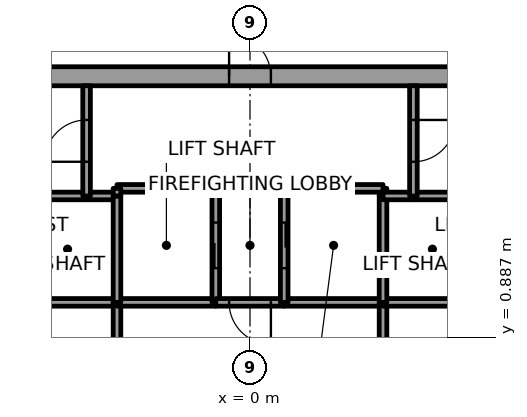
"""IFC4 building model, lengths in metres.
Left out: names, types, materials, properties, quantities, classifications, styles, units other than length and angle.
Written with IfcOpenShell. Run it as: python <this file> out.ifc"""

import sys

from ifc_helpers import new_model, si_unit, direction, frame, frame_2d, origin, place, context, subcontext, project, spatial, rectangle, extrude, element, fill, save


model = new_model("IFC4")
c1 = context("Model", 3, precision=1e-05, world=origin(), true_north=direction((0.0, 1.0)))
c2 = subcontext(c1, "Body", "Model", "MODEL_VIEW")
j1 = project(units=[si_unit("LENGTHUNIT", "METRE"), si_unit("PLANEANGLEUNIT", "RADIAN")], contexts=[c1])
p1 = place(None, origin())
s1 = spatial("IfcSite", under=j1, at=p1, CompositionType="ELEMENT")
p2 = place(p1, origin())
s2 = spatial("IfcBuilding", under=s1, at=p2, CompositionType="ELEMENT")
p3 = place(p2, frame((0.0, 0.0, 107.2)))
s3 = spatial("IfcBuildingStorey", under=s2, at=p3, CompositionType="ELEMENT", Elevation=107.2)
p4 = place(p3, frame((-11.0, 7.75, 0.0), z_axis=(0.0, 0.0, 1.0), x_axis=(1.0, 0.0, 0.0)))
e1 = element("IfcWall", 1, at=p4, inside=s3, PredefinedType="SHEAR", context=c2, shape_type="SweptSolid", body=[
    extrude(rectangle(XDim=22.0, YDim=0.5, at=frame_2d((11.0, 0.0))), origin(), (0.0, 0.0, 1.0), 5.4),
])
p5 = place(p4, frame((10.45, 0.0, 0.0)))
e2 = element("IfcOpeningElement", 2, at=p5, cuts=e1, PredefinedType="OPENING", context=c2, shape_type="SweptSolid", body=[
    extrude(rectangle(XDim=1.1, YDim=2.1, at=frame_2d((0.55, 1.05))), frame((0.0, 0.25, 0.0), z_axis=(0.0, -1.0, 0.0), x_axis=(1.0, 0.0, 0.0)), (0.0, 0.0, 1.0), 0.5),
])
p6 = place(p3, frame((-3.5, 1.8, 0.0), z_axis=(0.0, 0.0, 1.0), x_axis=(-1.0, 0.0, 0.0)))
e3 = element("IfcWall", 3, at=p6, inside=s3, PredefinedType="SOLIDWALL", context=c2, shape_type="SweptSolid", body=[
    extrude(rectangle(XDim=2.6, YDim=0.2, at=frame_2d((1.3, 0.0))), origin(), (0.0, 0.0, 1.0), 5.25),
])
p7 = place(p3, frame((-4.3, 4.6, 0.0), z_axis=(0.0, 0.0, 1.0), x_axis=(-1.0, 0.0, 0.0)))
e4 = element("IfcWall", 4, at=p7, inside=s3, PredefinedType="SOLIDWALL", context=c2, shape_type="SweptSolid", body=[
    extrude(rectangle(XDim=1.8, YDim=0.2, at=frame_2d((0.9, 0.0))), origin(), (0.0, 0.0, 1.0), 5.25),
])
p8 = place(p3, frame((-3.5, 4.6, 0.0), z_axis=(0.0, 0.0, 1.0), x_axis=(-1.0, 0.0, 0.0)))
e5 = element("IfcWall", 5, at=p8, inside=s3, PredefinedType="SOLIDWALL", context=c2, shape_type="SweptSolid", body=[
    extrude(rectangle(XDim=0.8, YDim=0.2, at=frame_2d((0.4, 0.0))), origin(), (0.0, 0.0, 1.0), 5.25),
])
p9 = place(p3, frame((-4.3, 4.6, 0.0), z_axis=(0.0, 0.0, 1.0), x_axis=(0.0, 1.0, 0.0)))
e6 = element("IfcWall", 6, at=p9, inside=s3, PredefinedType="SOLIDWALL", context=c2, shape_type="SweptSolid", body=[
    extrude(rectangle(XDim=2.9, YDim=0.2, at=frame_2d((1.45, 0.0))), origin(), (0.0, 0.0, 1.0), 5.25),
])
p10 = place(p9, frame((0.9, 0.0, 0.0)))
e7 = element("IfcOpeningElement", 7, at=p10, cuts=e6, PredefinedType="OPENING", context=c2, shape_type="SweptSolid", body=[
    extrude(rectangle(XDim=1.1, YDim=2.1, at=frame_2d((0.55, 1.05))), frame((0.0, 0.1, 0.0), z_axis=(0.0, -1.0, 0.0), x_axis=(1.0, 0.0, 0.0)), (0.0, 0.0, 1.0), 0.2),
])
p11 = place(p3, frame((-3.5, 1.8, 0.0), z_axis=(0.0, 0.0, 1.0), x_axis=(0.0, -1.0, 0.0)))
e8 = element("IfcWall", 8, at=p11, inside=s3, PredefinedType="SOLIDWALL", context=c2, shape_type="SweptSolid", body=[
    extrude(rectangle(XDim=3.6, YDim=0.2, at=frame_2d((1.8, 0.0))), origin(), (0.0, 0.0, 1.0), 5.25),
])
p12 = place(p11, frame((1.05, 0.0, 0.0)))
e9 = element("IfcOpeningElement", 9, at=p12, cuts=e8, PredefinedType="OPENING", context=c2, shape_type="SweptSolid", body=[
    extrude(rectangle(XDim=1.5, YDim=2.1, at=frame_2d((0.75, 1.05))), frame((0.0, 0.1, 0.0), z_axis=(0.0, -1.0, 0.0), x_axis=(1.0, 0.0, 0.0)), (0.0, 0.0, 1.0), 0.2),
])
p13 = place(p3, frame((-0.9, 1.8, 0.0), z_axis=(0.0, 0.0, 1.0), x_axis=(-1.0, 0.0, 0.0)))
e10 = element("IfcWall", 10, at=p13, inside=s3, PredefinedType="SOLIDWALL", context=c2, shape_type="SweptSolid", body=[
    extrude(rectangle(XDim=2.6, YDim=0.2, at=frame_2d((1.3, 0.0))), origin(), (0.0, 0.0, 1.0), 5.25),
])
p14 = place(p3, frame((-3.5, 4.6, 0.0), z_axis=(0.0, 0.0, 1.0), x_axis=(0.0, -1.0, 0.0)))
e11 = element("IfcWall", 11, at=p14, inside=s3, PredefinedType="SOLIDWALL", context=c2, shape_type="SweptSolid", body=[
    extrude(rectangle(XDim=2.8, YDim=0.2, at=frame_2d((1.4, 0.0))), origin(), (0.0, 0.0, 1.0), 5.25),
])
p15 = place(p3, frame((-0.9, 1.8, 0.0), z_axis=(0.0, 0.0, 1.0), x_axis=(0.0, 1.0, 0.0)))
e12 = element("IfcWall", 12, at=p15, inside=s3, PredefinedType="SOLIDWALL", context=c2, shape_type="SweptSolid", body=[
    extrude(rectangle(XDim=3.0, YDim=0.2, at=frame_2d((1.5, 0.0))), origin(), (0.0, 0.0, 1.0), 5.25),
])
p16 = place(p15, frame((0.9, 0.0, 0.0)))
e13 = element("IfcOpeningElement", 13, at=p16, cuts=e12, PredefinedType="OPENING", context=c2, shape_type="SweptSolid", body=[
    extrude(rectangle(XDim=1.2, YDim=2.1, at=frame_2d((0.6, 1.05))), frame((0.0, 0.1, 0.0), z_axis=(0.0, -1.0, 0.0), x_axis=(1.0, 0.0, 0.0)), (0.0, 0.0, 1.0), 0.2),
])
p17 = place(p3, frame((-0.9, 4.8, 0.0), z_axis=(0.0, 0.0, 1.0), x_axis=(-1.0, 0.0, 0.0)))
e14 = element("IfcWall", 14, at=p17, inside=s3, PredefinedType="SOLIDWALL", context=c2, shape_type="SweptSolid", body=[
    extrude(rectangle(XDim=2.6, YDim=0.2, at=frame_2d((1.3, 0.0))), origin(), (0.0, 0.0, 1.0), 5.25),
])
p18 = place(p3, frame((-3.5, 4.8, 0.0), z_axis=(0.0, 0.0, 1.0), x_axis=(0.0, -1.0, 0.0)))
e15 = element("IfcWall", 15, at=p18, inside=s3, PredefinedType="SOLIDWALL", context=c2, shape_type="SweptSolid", body=[
    extrude(rectangle(XDim=0.2, YDim=0.2, at=frame_2d((0.1, 0.0))), origin(), (0.0, 0.0, 1.0), 5.25),
])
p19 = place(p3, frame((0.9, 1.8, 0.0), z_axis=(0.0, 0.0, 1.0), x_axis=(-1.0, 0.0, 0.0)))
e16 = element("IfcWall", 16, at=p19, inside=s3, PredefinedType="SOLIDWALL", context=c2, shape_type="SweptSolid", body=[
    extrude(rectangle(XDim=1.8, YDim=0.2, at=frame_2d((0.9, 0.0))), origin(), (0.0, 0.0, 1.0), 5.25),
])
p20 = place(p19, frame((0.35, 0.0, 0.0)))
e17 = element("IfcOpeningElement", 17, at=p20, cuts=e16, PredefinedType="OPENING", context=c2, shape_type="SweptSolid", body=[
    extrude(rectangle(XDim=1.1, YDim=2.1, at=frame_2d((0.55, 1.05))), frame((0.0, 0.1, 0.0), z_axis=(0.0, -1.0, 0.0), x_axis=(1.0, 0.0, 0.0)), (0.0, 0.0, 1.0), 0.2),
])
p21 = place(p3, frame((3.5, 1.8, 0.0), z_axis=(0.0, 0.0, 1.0), x_axis=(-1.0, 0.0, 0.0)))
e18 = element("IfcWall", 18, at=p21, inside=s3, PredefinedType="SOLIDWALL", context=c2, shape_type="SweptSolid", body=[
    extrude(rectangle(XDim=2.6, YDim=0.2, at=frame_2d((1.3, 0.0))), origin(), (0.0, 0.0, 1.0), 5.25),
])
p22 = place(p3, frame((3.5, 4.6, 0.0), z_axis=(0.0, 0.0, 1.0), x_axis=(0.0, 1.0, 0.0)))
e19 = element("IfcWall", 19, at=p22, inside=s3, PredefinedType="SOLIDWALL", context=c2, shape_type="SweptSolid", body=[
    extrude(rectangle(XDim=0.2, YDim=0.2, at=frame_2d((0.1, 0.0))), origin(), (0.0, 0.0, 1.0), 5.25),
])
p23 = place(p3, frame((3.5, 4.8, 0.0), z_axis=(0.0, 0.0, 1.0), x_axis=(-1.0, 0.0, 0.0)))
e20 = element("IfcWall", 20, at=p23, inside=s3, PredefinedType="SOLIDWALL", context=c2, shape_type="SweptSolid", body=[
    extrude(rectangle(XDim=2.6, YDim=0.2, at=frame_2d((1.3, 0.0))), origin(), (0.0, 0.0, 1.0), 5.25),
])
p24 = place(p3, frame((0.9, 4.8, 0.0), z_axis=(0.0, 0.0, 1.0), x_axis=(0.0, -1.0, 0.0)))
e21 = element("IfcWall", 21, at=p24, inside=s3, PredefinedType="SOLIDWALL", context=c2, shape_type="SweptSolid", body=[
    extrude(rectangle(XDim=3.0, YDim=0.2, at=frame_2d((1.5, 0.0))), origin(), (0.0, 0.0, 1.0), 5.25),
])
p25 = place(p24, frame((0.9, 0.0, 0.0)))
e22 = element("IfcOpeningElement", 22, at=p25, cuts=e21, PredefinedType="OPENING", context=c2, shape_type="SweptSolid", body=[
    extrude(rectangle(XDim=1.2, YDim=2.1, at=frame_2d((0.6, 1.05))), frame((0.0, 0.1, 0.0), z_axis=(0.0, -1.0, 0.0), x_axis=(1.0, 0.0, 0.0)), (0.0, 0.0, 1.0), 0.2),
])
p26 = place(p3, frame((3.5, -1.8, 0.0), z_axis=(0.0, 0.0, 1.0), x_axis=(0.0, 1.0, 0.0)))
e23 = element("IfcWall", 23, at=p26, inside=s3, PredefinedType="SOLIDWALL", context=c2, shape_type="SweptSolid", body=[
    extrude(rectangle(XDim=3.6, YDim=0.2, at=frame_2d((1.8, 0.0))), origin(), (0.0, 0.0, 1.0), 5.25),
])
p27 = place(p26, frame((1.05, 0.0, 0.0)))
e24 = element("IfcOpeningElement", 24, at=p27, cuts=e23, PredefinedType="OPENING", context=c2, shape_type="SweptSolid", body=[
    extrude(rectangle(XDim=1.5, YDim=2.1, at=frame_2d((0.75, 1.05))), frame((0.0, 0.1, 0.0), z_axis=(0.0, -1.0, 0.0), x_axis=(1.0, 0.0, 0.0)), (0.0, 0.0, 1.0), 0.2),
])
p28 = place(p3, frame((6.1, 1.8, 0.0), z_axis=(0.0, 0.0, 1.0), x_axis=(-1.0, 0.0, 0.0)))
e25 = element("IfcWall", 25, at=p28, inside=s3, PredefinedType="SOLIDWALL", context=c2, shape_type="SweptSolid", body=[
    extrude(rectangle(XDim=2.6, YDim=0.2, at=frame_2d((1.3, 0.0))), origin(), (0.0, 0.0, 1.0), 5.25),
])
p29 = place(p3, frame((3.5, 1.8, 0.0), z_axis=(0.0, 0.0, 1.0), x_axis=(0.0, 1.0, 0.0)))
e26 = element("IfcWall", 26, at=p29, inside=s3, PredefinedType="SOLIDWALL", context=c2, shape_type="SweptSolid", body=[
    extrude(rectangle(XDim=2.8, YDim=0.2, at=frame_2d((1.4, 0.0))), origin(), (0.0, 0.0, 1.0), 5.25),
])
p30 = place(p3, frame((4.3, 4.6, 0.0), z_axis=(0.0, 0.0, 1.0), x_axis=(-1.0, 0.0, 0.0)))
e27 = element("IfcWall", 27, at=p30, inside=s3, PredefinedType="SOLIDWALL", context=c2, shape_type="SweptSolid", body=[
    extrude(rectangle(XDim=0.8, YDim=0.2, at=frame_2d((0.4, 0.0))), origin(), (0.0, 0.0, 1.0), 5.25),
])
p31 = place(p3, frame((6.1, 4.6, 0.0), z_axis=(0.0, 0.0, 1.0), x_axis=(-1.0, 0.0, 0.0)))
e28 = element("IfcWall", 28, at=p31, inside=s3, PredefinedType="SOLIDWALL", context=c2, shape_type="SweptSolid", body=[
    extrude(rectangle(XDim=1.8, YDim=0.2, at=frame_2d((0.9, 0.0))), origin(), (0.0, 0.0, 1.0), 5.25),
])
p32 = place(p3, frame((4.3, 7.5, 0.0), z_axis=(0.0, 0.0, 1.0), x_axis=(0.0, -1.0, 0.0)))
e29 = element("IfcWall", 29, at=p32, inside=s3, PredefinedType="SOLIDWALL", context=c2, shape_type="SweptSolid", body=[
    extrude(rectangle(XDim=2.9, YDim=0.2, at=frame_2d((1.45, 0.0))), origin(), (0.0, 0.0, 1.0), 5.25),
])
p33 = place(p32, frame((0.9, 0.0, 0.0)))
e30 = element("IfcOpeningElement", 30, at=p33, cuts=e29, PredefinedType="OPENING", context=c2, shape_type="SweptSolid", body=[
    extrude(rectangle(XDim=1.1, YDim=2.1, at=frame_2d((0.55, 1.05))), frame((0.0, 0.1, 0.0), z_axis=(0.0, -1.0, 0.0), x_axis=(1.0, 0.0, 0.0)), (0.0, 0.0, 1.0), 0.2),
])
p34 = place(p16, origin())
e31 = element("IfcDoor", 31, at=p34, inside=s3, OperationType="SLIDING_TO_RIGHT", PredefinedType="DOOR", context=c2, shape_type="SweptSolid", body=[
    extrude(rectangle(XDim=1.2, YDim=2.1, at=frame_2d((0.6, 1.05))), frame((0.0, 0.025, 0.0), z_axis=(0.0, -1.0, 0.0), x_axis=(1.0, 0.0, 0.0)), (0.0, 0.0, 1.0), 0.05),
])
fill(e13, e31)
p35 = place(p25, origin())
e32 = element("IfcDoor", 32, at=p35, inside=s3, OperationType="SLIDING_TO_LEFT", PredefinedType="DOOR", context=c2, shape_type="SweptSolid", body=[
    extrude(rectangle(XDim=1.2, YDim=2.1, at=frame_2d((0.6, 1.05))), frame((0.0, 0.025, 0.0), z_axis=(0.0, -1.0, 0.0), x_axis=(1.0, 0.0, 0.0)), (0.0, 0.0, 1.0), 0.05),
])
fill(e22, e32)
p36 = place(p20, origin())
e33 = element("IfcDoor", 33, at=p36, inside=s3, OperationType="SINGLE_SWING_LEFT", PredefinedType="DOOR", context=c2, shape_type="SweptSolid", body=[
    extrude(rectangle(XDim=1.1, YDim=2.1, at=frame_2d((0.55, 1.05))), frame((0.0, 0.025, 0.0), z_axis=(0.0, -1.0, 0.0), x_axis=(1.0, 0.0, 0.0)), (0.0, 0.0, 1.0), 0.05),
])
fill(e17, e33)
p37 = place(p10, origin())
e34 = element("IfcDoor", 34, at=p37, inside=s3, OperationType="SINGLE_SWING_RIGHT", PredefinedType="DOOR", context=c2, shape_type="SweptSolid", body=[
    extrude(rectangle(XDim=1.1, YDim=2.1, at=frame_2d((0.55, 1.05))), frame((0.0, 0.025, 0.0), z_axis=(0.0, -1.0, 0.0), x_axis=(1.0, 0.0, 0.0)), (0.0, 0.0, 1.0), 0.05),
])
fill(e7, e34)
p38 = place(p33, origin())
e35 = element("IfcDoor", 35, at=p38, inside=s3, OperationType="SINGLE_SWING_LEFT", PredefinedType="DOOR", context=c2, shape_type="SweptSolid", body=[
    extrude(rectangle(XDim=1.1, YDim=2.1, at=frame_2d((0.55, 1.05))), frame((0.0, 0.025, 0.0), z_axis=(0.0, -1.0, 0.0), x_axis=(1.0, 0.0, 0.0)), (0.0, 0.0, 1.0), 0.05),
])
fill(e30, e35)
p39 = place(p5, origin())
e36 = element("IfcDoor", 36, at=p39, inside=s3, OperationType="SINGLE_SWING_RIGHT", PredefinedType="DOOR", context=c2, shape_type="SweptSolid", body=[
    extrude(rectangle(XDim=1.1, YDim=2.1, at=frame_2d((0.55, 1.05))), frame((0.0, 0.025, 0.0), z_axis=(0.0, -1.0, 0.0), x_axis=(1.0, 0.0, 0.0)), (0.0, 0.0, 1.0), 0.05),
])
fill(e2, e36)
save(model, sys.argv[1])
